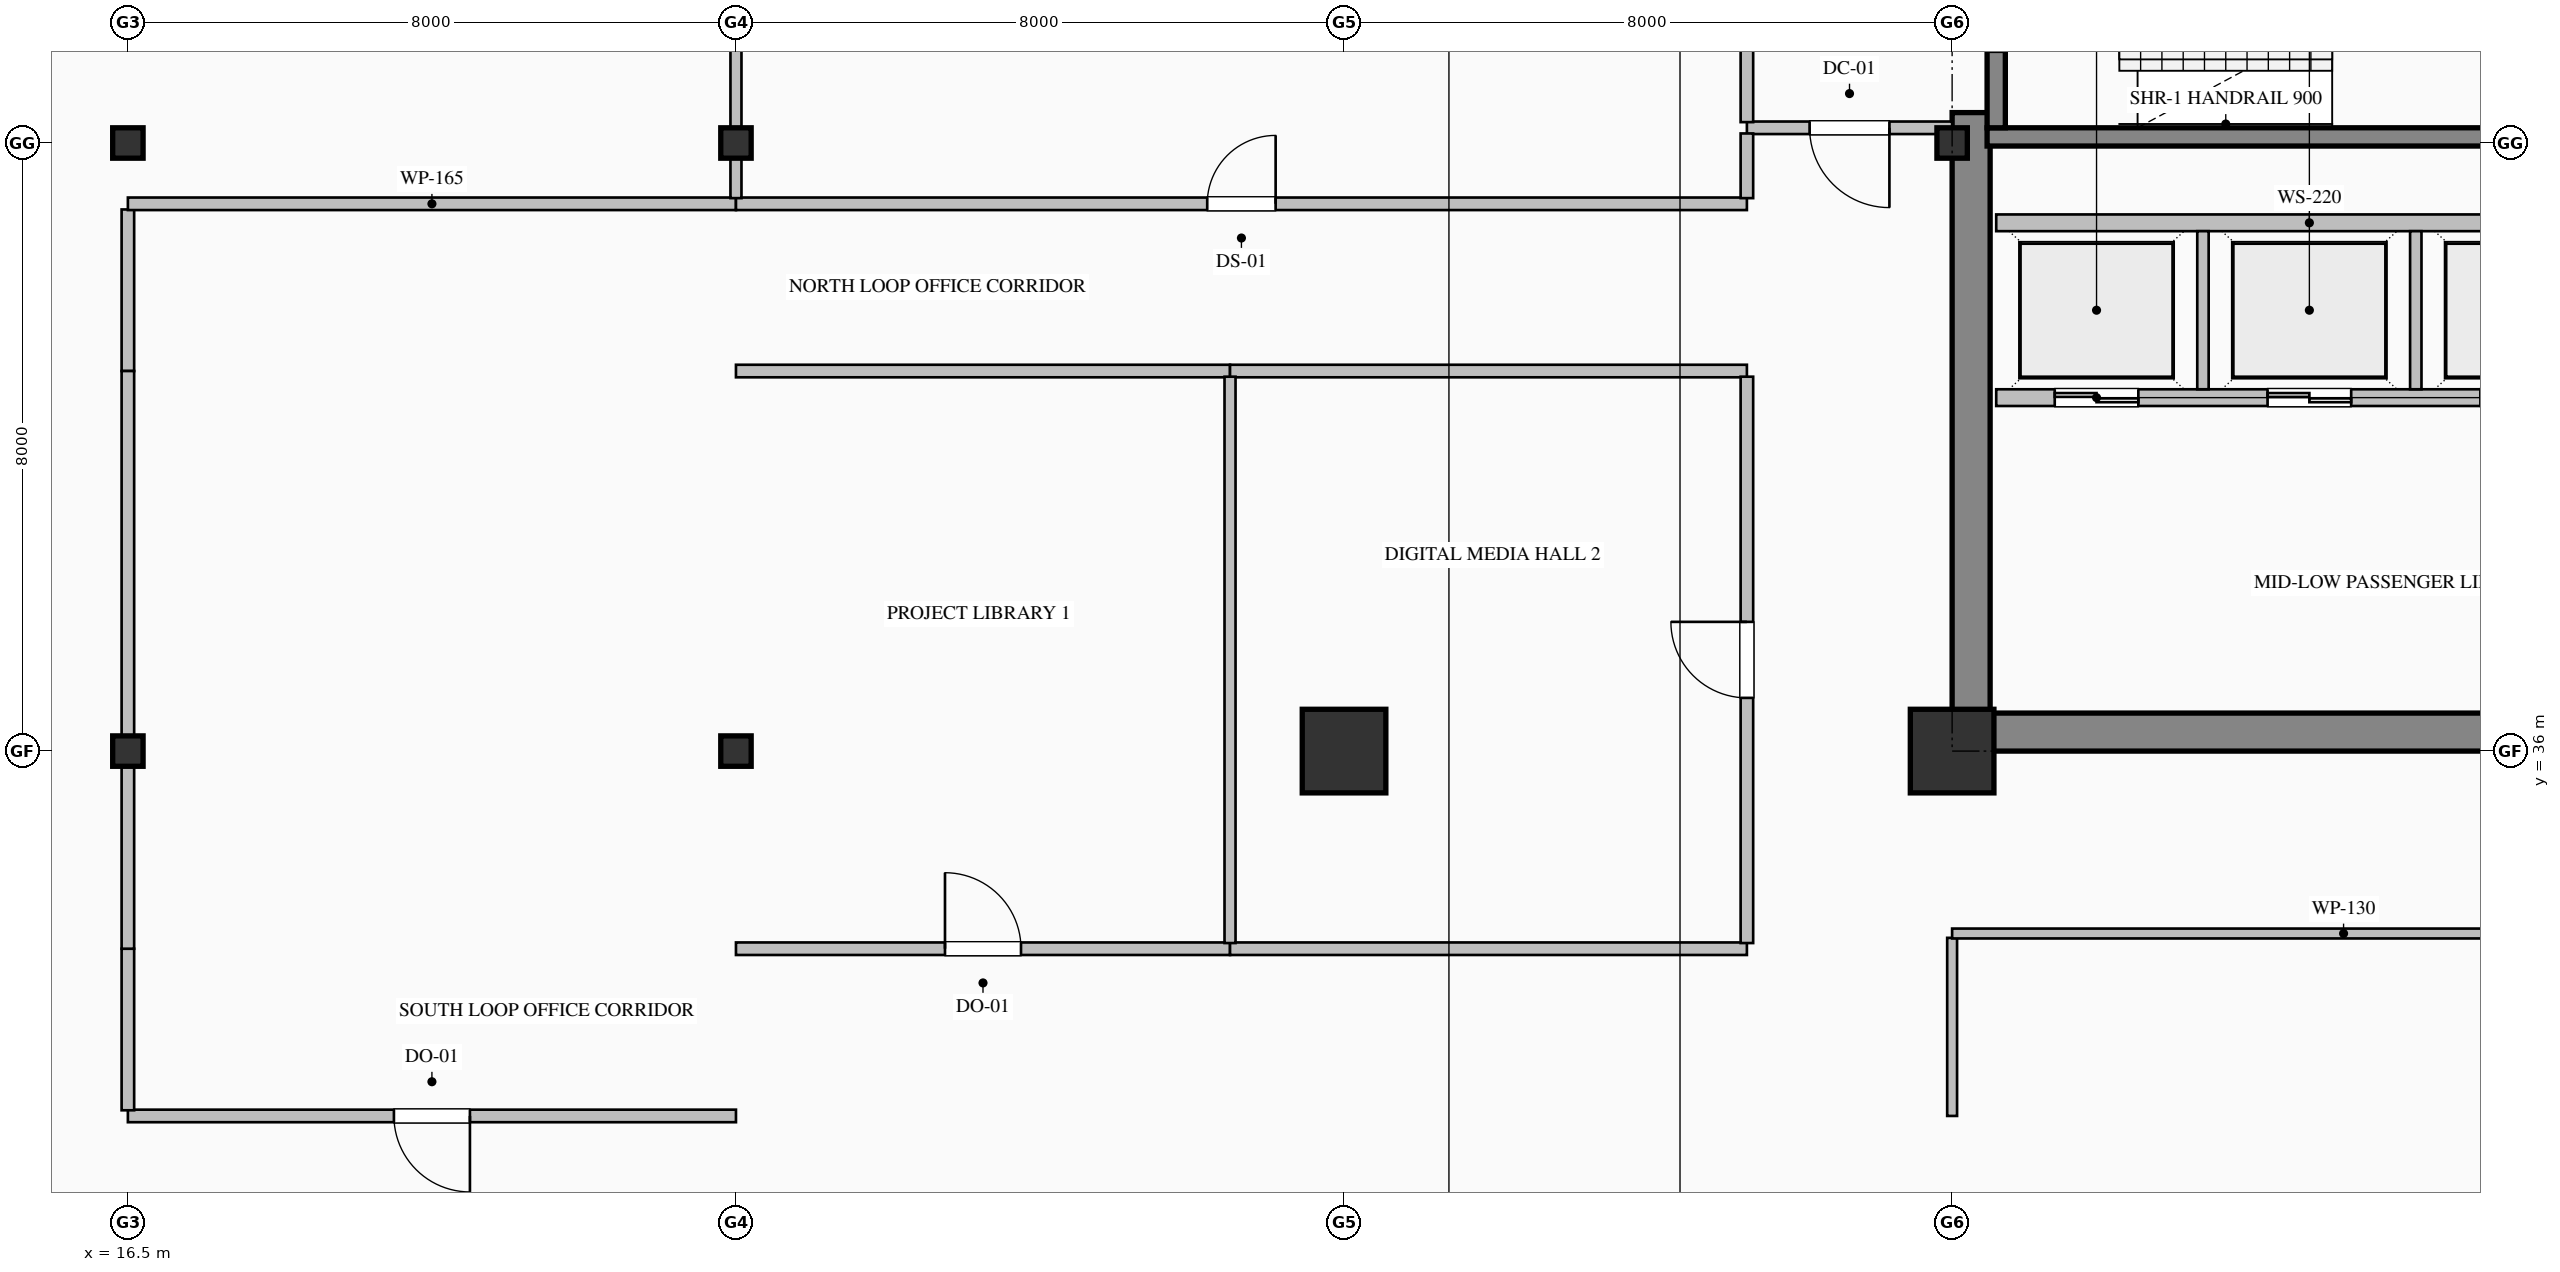
"""IFC4 building model, lengths in metres.
Left out: names, types, materials, properties, quantities, classifications, styles, units other than length and angle.
Written with IfcOpenShell. Run it as: python <this file> out.ifc"""

import sys

from ifc_helpers import new_model, si_unit, direction, frame, frame_2d, origin, origin_2d, place, context, subcontext, project, spatial, rectangle, hollow_rectangle, i_section, extrude, element, fill, save


model = new_model("IFC4")
c1 = context("Model", 3, precision=1e-05, world=origin(), true_north=direction((0.0, 1.0)))
c2 = subcontext(c1, "Body", "Model", "MODEL_VIEW")
j1 = project(units=[si_unit("LENGTHUNIT", "METRE"), si_unit("PLANEANGLEUNIT", "RADIAN")], contexts=[c1])
p1 = place(None, origin())
s1 = spatial("IfcSite", under=j1, at=p1, CompositionType="ELEMENT")
p2 = place(p1, origin())
s2 = spatial("IfcBuilding", under=s1, at=p2, CompositionType="ELEMENT")
p3 = place(p2, frame((0.0, 0.0, 151.0)))
s3 = spatial("IfcBuildingStorey", under=s2, at=p3, CompositionType="ELEMENT", Elevation=151.0)
p4 = place(p3, frame((40.75, 36.5, 0.0), z_axis=(0.0, 0.0, 1.0), x_axis=(0.0, 1.0, 0.0)))
e1 = element("IfcWall", 1, at=p4, inside=s3, PredefinedType="SHEAR", context=c2, shape_type="SweptSolid", body=[
    extrude(rectangle(XDim=7.9, YDim=0.5, at=frame_2d((3.95, 0.0))), origin(), (0.0, 0.0, 1.0), 3.765),
])
p5 = place(p3, frame((40.5, 36.25, 0.0), z_axis=(0.0, 0.0, 1.0), x_axis=(1.0, 0.0, 0.0)))
e2 = element("IfcWall", 2, at=p5, inside=s3, PredefinedType="SHEAR", context=c2, shape_type="SweptSolid", body=[
    extrude(rectangle(XDim=9.1, YDim=0.5, at=frame_2d((4.55, 0.0))), origin(), (0.0, 0.0, 1.0), 3.765),
])
for number, where, z_axis, x_axis in (
    (3, (16.5, 36.0, 0.0), (0.0, 0.0, 1.0), (1.0, 0.0, 0.0)),
    (4, (16.5, 44.0, 0.0), (0.0, 0.0, 1.0), (1.0, 0.0, 0.0)),
    (5, (24.5, 36.0, 0.0), (0.0, 0.0, 1.0), (1.0, 0.0, 0.0)),
    (6, (24.5, 44.0, 0.0), (0.0, 0.0, 1.0), (1.0, 0.0, 0.0)),
):
    element("IfcColumn", number, at=place(p3, frame(where, z_axis=z_axis, x_axis=x_axis)), inside=s3, PredefinedType="COLUMN", context=c2, shape_type="SweptSolid", body=[
        extrude(i_section(OverallWidth=0.4, OverallDepth=0.4, WebThickness=0.013, FlangeThickness=0.021, FilletRadius=0.022, at=origin_2d()), origin(), (0.0, 0.0, 1.0), 4.0),
    ])
for number, where, z_axis, x_axis in (
    (7, (32.5, 36.0, 0.0), (0.0, 0.0, 1.0), (1.0, 0.0, 0.0)),
    (8, (40.5, 36.0, 0.0), (0.0, 0.0, 1.0), (1.0, 0.0, 0.0)),
):
    element("IfcColumn", number, at=place(p3, frame(where, z_axis=z_axis, x_axis=x_axis)), inside=s3, PredefinedType="COLUMN", context=c2, shape_type="SweptSolid", body=[
        extrude(hollow_rectangle(XDim=1.1, YDim=1.1, WallThickness=0.04, at=origin_2d()), origin(), (0.0, 0.0, 1.0), 4.0),
    ])
p6 = place(p3, frame((40.5, 44.0, 0.0), z_axis=(0.0, 0.0, 1.0), x_axis=(1.0, 0.0, 0.0)))
e9 = element("IfcColumn", 9, at=p6, inside=s3, PredefinedType="COLUMN", context=c2, shape_type="SweptSolid", body=[
    extrude(i_section(OverallWidth=0.4, OverallDepth=0.4, WebThickness=0.013, FlangeThickness=0.021, FilletRadius=0.022, at=origin_2d()), origin(), (0.0, 0.0, 1.0), 4.0),
])
p7 = place(p3, frame((49.04, 44.08, 0.0), z_axis=(0.0, 0.0, 1.0), x_axis=(-1.0, 0.0, 0.0)))
e10 = element("IfcWall", 10, at=p7, inside=s3, PredefinedType="SOLIDWALL", context=c2, shape_type="SweptSolid", body=[
    extrude(rectangle(XDim=8.08, YDim=0.24, at=frame_2d((4.04, 0.0))), origin(), (0.0, 0.0, 1.0), 4.0),
])
p8 = place(p3, frame((41.08, 47.35, 0.0), z_axis=(0.0, 0.0, 1.0), x_axis=(0.0, -1.0, 0.0)))
e11 = element("IfcWall", 11, at=p8, inside=s3, PredefinedType="SOLIDWALL", context=c2, shape_type="SweptSolid", body=[
    extrude(rectangle(XDim=3.15, YDim=0.24, at=frame_2d((1.575, 0.0))), origin(), (0.0, 0.0, 1.0), 4.0),
])
p9 = place(p8, frame((1.0, 0.0, 0.0)))
e12 = element("IfcOpeningElement", 12, at=p9, cuts=e11, PredefinedType="OPENING", context=c2, shape_type="SweptSolid", body=[
    extrude(rectangle(XDim=1.15, YDim=2.2, at=frame_2d((0.575, 1.1))), frame((0.0, 0.13, 0.0), z_axis=(0.0, -1.0, 0.0), x_axis=(1.0, 0.0, 0.0)), (0.0, 0.0, 1.0), 0.26),
])
p10 = place(p3, frame((49.32, 40.65, 0.0), z_axis=(0.0, 0.0, 1.0), x_axis=(-1.0, 0.0, 0.0)))
e13 = element("IfcWall", 13, at=p10, inside=s3, PredefinedType="PARTITIONING", context=c2, shape_type="SweptSolid", body=[
    extrude(rectangle(XDim=8.24, YDim=0.22, at=frame_2d((4.12, 0.0))), origin(), (0.0, 0.0, 1.0), 3.765),
])
p11 = place(p10, frame((6.37, 0.0, 0.0)))
e14 = element("IfcOpeningElement", 14, at=p11, cuts=e13, PredefinedType="OPENING", context=c2, shape_type="SweptSolid", body=[
    extrude(rectangle(XDim=1.1, YDim=2.2, at=frame_2d((0.55, 1.1))), frame((0.0, 0.12, 0.0), z_axis=(0.0, -1.0, 0.0), x_axis=(1.0, 0.0, 0.0)), (0.0, 0.0, 1.0), 0.24),
])
p12 = place(p10, frame((3.57, 0.0, 0.0)))
e15 = element("IfcOpeningElement", 15, at=p12, cuts=e13, PredefinedType="OPENING", context=c2, shape_type="SweptSolid", body=[
    extrude(rectangle(XDim=1.1, YDim=2.2, at=frame_2d((0.55, 1.1))), frame((0.0, 0.12, 0.0), z_axis=(0.0, -1.0, 0.0), x_axis=(1.0, 0.0, 0.0)), (0.0, 0.0, 1.0), 0.24),
])
p13 = place(p10, frame((0.77, 0.0, 0.0)))
e16 = element("IfcOpeningElement", 16, at=p13, cuts=e13, PredefinedType="OPENING", context=c2, shape_type="SweptSolid", body=[
    extrude(rectangle(XDim=1.1, YDim=2.2, at=frame_2d((0.55, 1.1))), frame((0.0, 0.12, 0.0), z_axis=(0.0, -1.0, 0.0), x_axis=(1.0, 0.0, 0.0)), (0.0, 0.0, 1.0), 0.24),
])
p14 = place(p3, frame((41.08, 42.95, 0.0), z_axis=(0.0, 0.0, 1.0), x_axis=(1.0, 0.0, 0.0)))
e17 = element("IfcWall", 17, at=p14, inside=s3, PredefinedType="PARTITIONING", context=c2, shape_type="SweptSolid", body=[
    extrude(rectangle(XDim=8.24, YDim=0.22, at=frame_2d((4.12, 0.0))), origin(), (0.0, 0.0, 1.0), 3.765),
])
for number, where, z_axis, x_axis in (
    (18, (43.8, 40.76, 0.0), (0.0, 0.0, 1.0), (0.0, 1.0, 0.0)),
    (19, (46.6, 40.76, 0.0), (0.0, 0.0, 1.0), (0.0, 1.0, 0.0)),
):
    element("IfcWall", number, at=place(p3, frame(where, z_axis=z_axis, x_axis=x_axis)), inside=s3, PredefinedType="PARTITIONING", context=c2, shape_type="SweptSolid", body=[
        extrude(rectangle(XDim=2.08, YDim=0.15, at=frame_2d((1.04, 0.0))), origin(), (0.0, 0.0, 1.0), 3.765),
    ])
p15 = place(p3, frame((40.5, 44.2, 0.0), z_axis=(0.0, 0.0, 1.0), x_axis=(-1.0, 0.0, 0.0)))
e20 = element("IfcWall", 20, at=p15, inside=s3, PredefinedType="PARTITIONING", context=c2, shape_type="SweptSolid", body=[
    extrude(rectangle(XDim=2.7, YDim=0.165, at=frame_2d((1.35, 0.0))), origin(), (0.0, 0.0, 1.0), 3.765),
])
p16 = place(p15, frame((0.825, 0.0, 0.0)))
e21 = element("IfcOpeningElement", 21, at=p16, cuts=e20, PredefinedType="OPENING", context=c2, shape_type="SweptSolid", body=[
    extrude(rectangle(XDim=1.05, YDim=2.15, at=frame_2d((0.525, 1.075))), frame((0.0, 0.093, 0.0), z_axis=(0.0, -1.0, 0.0), x_axis=(1.0, 0.0, 0.0)), (0.0, 0.0, 1.0), 0.185),
])
p17 = place(p3, frame((37.8, 44.274, 0.0), z_axis=(0.0, 0.0, 1.0), x_axis=(0.0, 1.0, 0.0)))
e22 = element("IfcWall", 22, at=p17, inside=s3, PredefinedType="PARTITIONING", context=c2, shape_type="SweptSolid", body=[
    extrude(rectangle(XDim=3.051, YDim=0.165, at=frame_2d((1.525, 0.0))), origin(), (0.0, 0.0, 1.0), 3.765),
])
p18 = place(p3, frame((24.5, 31.2, 0.0), z_axis=(0.0, 0.0, 1.0), x_axis=(-1.0, 0.0, 0.0)))
e23 = element("IfcWall", 23, at=p18, inside=s3, PredefinedType="PARTITIONING", context=c2, shape_type="SweptSolid", body=[
    extrude(rectangle(XDim=8.0, YDim=0.165, at=frame_2d((4.0, 0.0))), origin(), (0.0, 0.0, 1.0), 3.765),
])
p19 = place(p18, frame((3.5, 0.0, 0.0)))
e24 = element("IfcOpeningElement", 24, at=p19, cuts=e23, PredefinedType="OPENING", context=c2, shape_type="SweptSolid", body=[
    extrude(rectangle(XDim=1.0, YDim=2.15, at=frame_2d((0.5, 1.075))), frame((0.0, 0.093, 0.0), z_axis=(0.0, -1.0, 0.0), x_axis=(1.0, 0.0, 0.0)), (0.0, 0.0, 1.0), 0.185),
])
p20 = place(p3, frame((16.5, 31.274, 0.0), z_axis=(0.0, 0.0, 1.0), x_axis=(0.0, 1.0, 0.0)))
e25 = element("IfcWall", 25, at=p20, inside=s3, PredefinedType="PARTITIONING", context=c2, shape_type="SweptSolid", body=[
    extrude(rectangle(XDim=2.125, YDim=0.165, at=frame_2d((1.063, 0.0))), origin(), (0.0, 0.0, 1.0), 3.157),
])
p21 = place(p3, frame((24.5, 33.4, 0.0), z_axis=(0.0, 0.0, 1.0), x_axis=(1.0, 0.0, 0.0)))
e26 = element("IfcWall", 26, at=p21, inside=s3, PredefinedType="PARTITIONING", context=c2, shape_type="SweptSolid", body=[
    extrude(rectangle(XDim=6.5, YDim=0.165, at=frame_2d((3.25, 0.0))), origin(), (0.0, 0.0, 1.0), 3.765),
])
p22 = place(p21, frame((2.75, 0.0, 0.0)))
e27 = element("IfcOpeningElement", 27, at=p22, cuts=e26, PredefinedType="OPENING", context=c2, shape_type="SweptSolid", body=[
    extrude(rectangle(XDim=1.0, YDim=2.15, at=frame_2d((0.5, 1.075))), frame((0.0, 0.093, 0.0), z_axis=(0.0, -1.0, 0.0), x_axis=(1.0, 0.0, 0.0)), (0.0, 0.0, 1.0), 0.185),
])
p23 = place(p3, frame((31.0, 33.4, 0.0), z_axis=(0.0, 0.0, 1.0), x_axis=(1.0, 0.0, 0.0)))
e28 = element("IfcWall", 28, at=p23, inside=s3, PredefinedType="PARTITIONING", context=c2, shape_type="SweptSolid", body=[
    extrude(rectangle(XDim=6.8, YDim=0.165, at=frame_2d((3.4, 0.0))), origin(), (0.0, 0.0, 1.0), 3.765),
])
p24 = place(p3, frame((16.5, 41.0, 0.0), z_axis=(0.0, 0.0, 1.0), x_axis=(0.0, 1.0, 0.0)))
e29 = element("IfcWall", 29, at=p24, inside=s3, PredefinedType="PARTITIONING", context=c2, shape_type="SweptSolid", body=[
    extrude(rectangle(XDim=2.125, YDim=0.165, at=frame_2d((1.063, 0.0))), origin(), (0.0, 0.0, 1.0), 3.157),
])
p25 = place(p3, frame((16.5, 43.2, 0.0), z_axis=(0.0, 0.0, 1.0), x_axis=(1.0, 0.0, 0.0)))
e30 = element("IfcWall", 30, at=p25, inside=s3, PredefinedType="PARTITIONING", context=c2, shape_type="SweptSolid", body=[
    extrude(rectangle(XDim=8.0, YDim=0.165, at=frame_2d((4.0, 0.0))), origin(), (0.0, 0.0, 1.0), 3.765),
])
p26 = place(p3, frame((24.5, 43.2, 0.0), z_axis=(0.0, 0.0, 1.0), x_axis=(1.0, 0.0, 0.0)))
e31 = element("IfcWall", 31, at=p26, inside=s3, PredefinedType="PARTITIONING", context=c2, shape_type="SweptSolid", body=[
    extrude(rectangle(XDim=13.3, YDim=0.165, at=frame_2d((6.65, 0.0))), origin(), (0.0, 0.0, 1.0), 3.765),
])
p27 = place(p26, frame((6.2, 0.0, 0.0)))
e32 = element("IfcOpeningElement", 32, at=p27, cuts=e31, PredefinedType="OPENING", context=c2, shape_type="SweptSolid", body=[
    extrude(rectangle(XDim=0.9, YDim=2.15, at=frame_2d((0.45, 1.075))), frame((0.0, 0.093, 0.0), z_axis=(0.0, -1.0, 0.0), x_axis=(1.0, 0.0, 0.0)), (0.0, 0.0, 1.0), 0.185),
])
p28 = place(p3, frame((31.0, 41.0, 0.0), z_axis=(0.0, 0.0, 1.0), x_axis=(-1.0, 0.0, 0.0)))
e33 = element("IfcWall", 33, at=p28, inside=s3, PredefinedType="PARTITIONING", context=c2, shape_type="SweptSolid", body=[
    extrude(rectangle(XDim=6.5, YDim=0.165, at=frame_2d((3.25, 0.0))), origin(), (0.0, 0.0, 1.0), 3.765),
])
p29 = place(p3, frame((37.8, 41.0, 0.0), z_axis=(0.0, 0.0, 1.0), x_axis=(-1.0, 0.0, 0.0)))
e34 = element("IfcWall", 34, at=p29, inside=s3, PredefinedType="PARTITIONING", context=c2, shape_type="SweptSolid", body=[
    extrude(rectangle(XDim=6.8, YDim=0.165, at=frame_2d((3.4, 0.0))), origin(), (0.0, 0.0, 1.0), 3.765),
])
p30 = place(p3, frame((16.5, 33.4, 0.0), z_axis=(0.0, 0.0, 1.0), x_axis=(0.0, 1.0, 0.0)))
e35 = element("IfcWall", 35, at=p30, inside=s3, PredefinedType="PARTITIONING", context=c2, shape_type="SweptSolid", body=[
    extrude(rectangle(XDim=7.6, YDim=0.165, at=frame_2d((3.8, 0.0))), origin(), (0.0, 0.0, 1.0), 3.157),
])
p31 = place(p3, frame((37.8, 43.274, 0.0), z_axis=(0.0, 0.0, 1.0), x_axis=(0.0, 1.0, 0.0)))
e36 = element("IfcWall", 36, at=p31, inside=s3, PredefinedType="PARTITIONING", context=c2, shape_type="SweptSolid", body=[
    extrude(rectangle(XDim=0.851, YDim=0.165, at=frame_2d((0.426, 0.0))), origin(), (0.0, 0.0, 1.0), 3.765),
])
p32 = place(p3, frame((37.8, 33.475, 0.0), z_axis=(0.0, 0.0, 1.0), x_axis=(0.0, 1.0, 0.0)))
e37 = element("IfcWall", 37, at=p32, inside=s3, PredefinedType="PARTITIONING", context=c2, shape_type="SweptSolid", body=[
    extrude(rectangle(XDim=7.451, YDim=0.165, at=frame_2d((3.726, 0.0))), origin(), (0.0, 0.0, 1.0), 3.765),
])
p33 = place(p32, frame((3.226, 0.0, 0.0)))
e38 = element("IfcOpeningElement", 38, at=p33, cuts=e37, PredefinedType="OPENING", context=c2, shape_type="SweptSolid", body=[
    extrude(rectangle(XDim=1.0, YDim=2.15, at=frame_2d((0.5, 1.075))), frame((0.0, 0.093, 0.0), z_axis=(0.0, -1.0, 0.0), x_axis=(1.0, 0.0, 0.0)), (0.0, 0.0, 1.0), 0.185),
])
p34 = place(p3, frame((40.5, 33.543, 0.0), z_axis=(0.0, 0.0, 1.0), x_axis=(0.0, -1.0, 0.0)))
e39 = element("IfcWall", 39, at=p34, inside=s3, PredefinedType="PARTITIONING", context=c2, shape_type="SweptSolid", body=[
    extrude(rectangle(XDim=2.343, YDim=0.13, at=frame_2d((1.171, 0.0))), origin(), (0.0, 0.0, 1.0), 3.157),
])
p35 = place(p3, frame((50.8, 33.6, 0.0), z_axis=(0.0, 0.0, 1.0), x_axis=(-1.0, 0.0, 0.0)))
e40 = element("IfcWall", 40, at=p35, inside=s3, PredefinedType="PARTITIONING", context=c2, shape_type="SweptSolid", body=[
    extrude(rectangle(XDim=10.3, YDim=0.13, at=frame_2d((5.15, 0.0))), origin(), (0.0, 0.0, 1.0), 3.765),
])
p36 = place(p3, frame((24.5, 51.648, 0.0), z_axis=(0.0, 0.0, 1.0), x_axis=(0.0, -1.0, 0.0)))
e41 = element("IfcWall", 41, at=p36, inside=s3, PredefinedType="PARTITIONING", context=c2, shape_type="SweptSolid", body=[
    extrude(rectangle(XDim=8.374, YDim=0.145, at=frame_2d((4.187, 0.0))), origin(), (0.0, 0.0, 1.0), 3.157),
])
p37 = place(p3, frame((31.0, 40.926, 0.0), z_axis=(0.0, 0.0, 1.0), x_axis=(0.0, -1.0, 0.0)))
e42 = element("IfcWall", 42, at=p37, inside=s3, PredefinedType="PARTITIONING", context=c2, shape_type="SweptSolid", body=[
    extrude(rectangle(XDim=7.451, YDim=0.145, at=frame_2d((3.726, 0.0))), origin(), (0.0, 0.0, 1.0), 3.765),
])
p38 = place(p11, origin())
e43 = element("IfcDoor", 43, at=p38, inside=s3, OperationType="DOUBLE_DOOR_SLIDING", PredefinedType="DOOR", context=c2, shape_type="SweptSolid", body=[
    extrude(rectangle(XDim=1.1, YDim=2.2, at=frame_2d((0.55, 1.1))), frame((0.0, 0.025, 0.0), z_axis=(0.0, -1.0, 0.0), x_axis=(1.0, 0.0, 0.0)), (0.0, 0.0, 1.0), 0.05),
])
fill(e14, e43)
p39 = place(p12, origin())
e44 = element("IfcDoor", 44, at=p39, inside=s3, OperationType="DOUBLE_DOOR_SLIDING", PredefinedType="DOOR", context=c2, shape_type="SweptSolid", body=[
    extrude(rectangle(XDim=1.1, YDim=2.2, at=frame_2d((0.55, 1.1))), frame((0.0, 0.025, 0.0), z_axis=(0.0, -1.0, 0.0), x_axis=(1.0, 0.0, 0.0)), (0.0, 0.0, 1.0), 0.05),
])
fill(e15, e44)
p40 = place(p16, origin())
e45 = element("IfcDoor", 45, at=p40, inside=s3, OperationType="SINGLE_SWING_LEFT", PredefinedType="DOOR", context=c2, shape_type="SweptSolid", body=[
    extrude(rectangle(XDim=1.05, YDim=2.15, at=frame_2d((0.525, 1.075))), frame((0.0, 0.025, 0.0), z_axis=(0.0, -1.0, 0.0), x_axis=(1.0, 0.0, 0.0)), (0.0, 0.0, 1.0), 0.05),
])
fill(e21, e45)
p41 = place(p19, origin())
e46 = element("IfcDoor", 46, at=p41, inside=s3, OperationType="SINGLE_SWING_LEFT", PredefinedType="DOOR", context=c2, shape_type="SweptSolid", body=[
    extrude(rectangle(XDim=1.0, YDim=2.15, at=frame_2d((0.5, 1.075))), frame((0.0, 0.025, 0.0), z_axis=(0.0, -1.0, 0.0), x_axis=(1.0, 0.0, 0.0)), (0.0, 0.0, 1.0), 0.05),
])
fill(e24, e46)
p42 = place(p27, origin())
e47 = element("IfcDoor", 47, at=p42, inside=s3, OperationType="SINGLE_SWING_RIGHT", PredefinedType="DOOR", context=c2, shape_type="SweptSolid", body=[
    extrude(rectangle(XDim=0.9, YDim=2.15, at=frame_2d((0.45, 1.075))), frame((0.0, 0.025, 0.0), z_axis=(0.0, -1.0, 0.0), x_axis=(1.0, 0.0, 0.0)), (0.0, 0.0, 1.0), 0.05),
])
fill(e32, e47)
p43 = place(p22, origin())
e48 = element("IfcDoor", 48, at=p43, inside=s3, OperationType="SINGLE_SWING_LEFT", PredefinedType="DOOR", context=c2, shape_type="SweptSolid", body=[
    extrude(rectangle(XDim=1.0, YDim=2.15, at=frame_2d((0.5, 1.075))), frame((0.0, 0.025, 0.0), z_axis=(0.0, -1.0, 0.0), x_axis=(1.0, 0.0, 0.0)), (0.0, 0.0, 1.0), 0.05),
])
fill(e27, e48)
p44 = place(p33, origin())
e49 = element("IfcDoor", 49, at=p44, inside=s3, OperationType="SINGLE_SWING_RIGHT", PredefinedType="DOOR", context=c2, shape_type="SweptSolid", body=[
    extrude(rectangle(XDim=1.0, YDim=2.15, at=frame_2d((0.5, 1.075))), frame((0.0, 0.025, 0.0), z_axis=(0.0, -1.0, 0.0), x_axis=(1.0, 0.0, 0.0)), (0.0, 0.0, 1.0), 0.05),
])
fill(e38, e49)
save(model, sys.argv[1])
